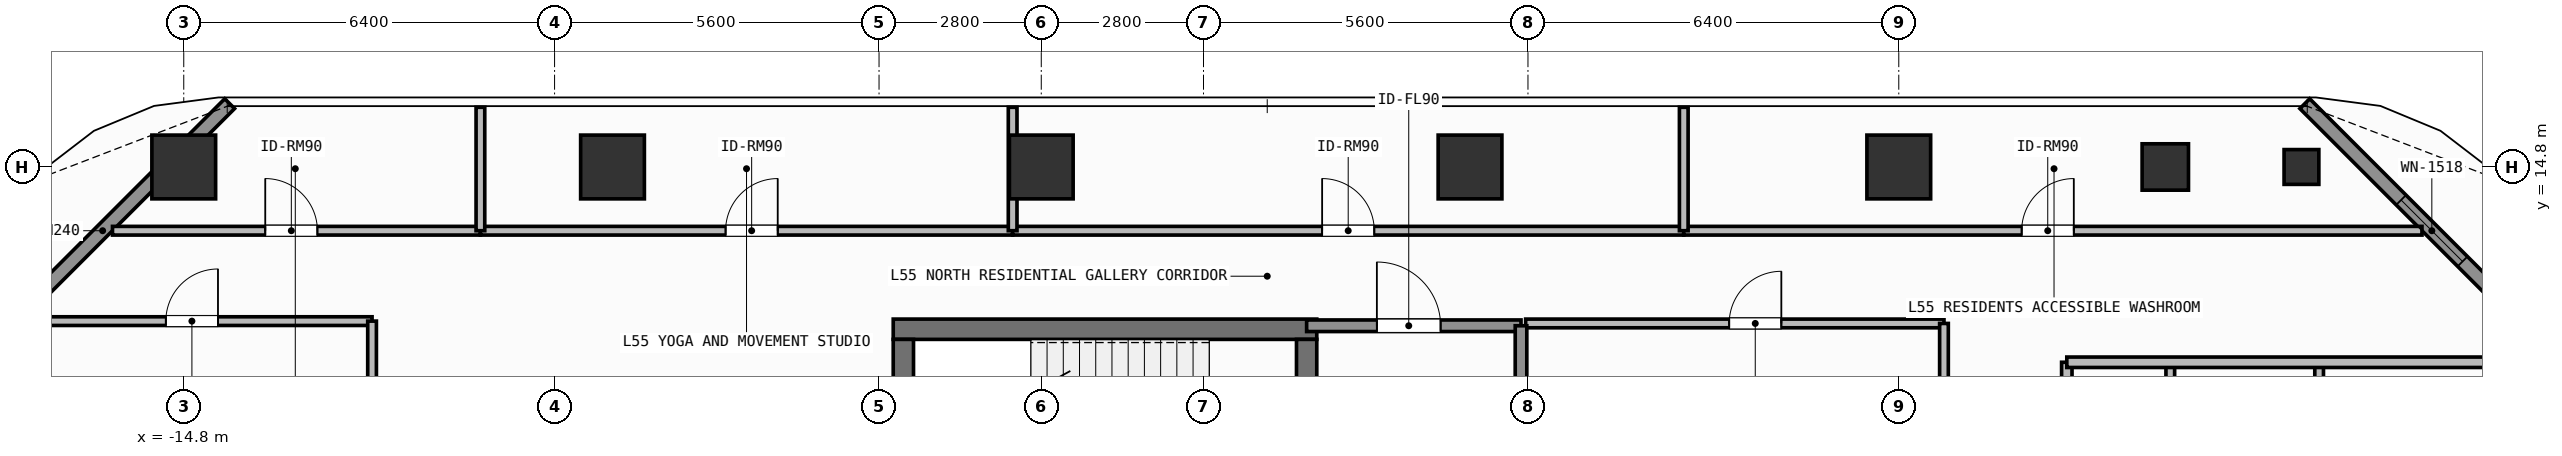
"""IFC4 building model, lengths in metres.
Left out: names, types, materials, properties, quantities, classifications, styles, units other than length and angle.
Written with IfcOpenShell. Run it as: python <this file> out.ifc"""

import sys

from ifc_helpers import new_model, si_unit, direction, frame, frame_2d, origin, origin_2d, place, context, subcontext, project, spatial, rectangle, hollow_rectangle, extrude, element, fill, save


model = new_model("IFC4")
c1 = context("Model", 3, precision=1e-05, world=origin(), true_north=direction((0.0, 1.0)))
c2 = subcontext(c1, "Body", "Model", "MODEL_VIEW")
j1 = project(units=[si_unit("LENGTHUNIT", "METRE"), si_unit("PLANEANGLEUNIT", "RADIAN")], contexts=[c1])
p1 = place(None, origin())
s1 = spatial("IfcSite", under=j1, at=p1, CompositionType="ELEMENT")
p2 = place(p1, origin())
s2 = spatial("IfcBuilding", under=s1, at=p2, CompositionType="ELEMENT")
p3 = place(p2, frame((0.0, 0.0, 223.5)))
s3 = spatial("IfcBuildingStorey", under=s2, at=p3, CompositionType="ELEMENT", Elevation=223.5)
p4 = place(p3, frame((-2.555, 12.0, 0.0), z_axis=(0.0, 0.0, 1.0), x_axis=(1.0, 0.0, 0.0)))
e1 = element("IfcWall", 1, at=p4, inside=s3, PredefinedType="SHEAR", context=c2, shape_type="SweptSolid", body=[
    extrude(rectangle(XDim=7.31, YDim=0.35, at=frame_2d((3.655, 0.0))), origin(), (0.0, 0.0, 1.0), 3.9),
])
p5 = place(p3, frame((-2.38, 8.9, 0.0), z_axis=(0.0, 0.0, 1.0), x_axis=(0.0, 1.0, 0.0)))
e2 = element("IfcWall", 2, at=p5, inside=s3, PredefinedType="SHEAR", context=c2, shape_type="SweptSolid", body=[
    extrude(rectangle(XDim=2.925, YDim=0.35, at=frame_2d((1.462, 0.0))), origin(), (0.0, 0.0, 1.0), 3.9),
])
p6 = place(p3, frame((4.58, 11.825, 0.0), z_axis=(0.0, 0.0, 1.0), x_axis=(0.0, -1.0, 0.0)))
e3 = element("IfcWall", 3, at=p6, inside=s3, PredefinedType="SHEAR", context=c2, shape_type="SweptSolid", body=[
    extrude(rectangle(XDim=2.925, YDim=0.35, at=frame_2d((1.462, 0.0))), origin(), (0.0, 0.0, 1.0), 3.9),
])
p7 = place(p6, frame((0.913, 0.0, 0.0)))
e4 = element("IfcOpeningElement", 4, at=p7, cuts=e3, PredefinedType="OPENING", context=c2, shape_type="SweptSolid", body=[
    extrude(rectangle(XDim=1.1, YDim=2.15, at=frame_2d((0.55, 1.075))), frame((0.0, 0.185, 0.0), z_axis=(0.0, -1.0, 0.0), x_axis=(1.0, 0.0, 0.0)), (0.0, 0.0, 1.0), 0.37),
])
for number, where, z_axis, x_axis in (
    (5, (-14.8, 14.8, 0.0), (0.0, 0.0, 1.0), (1.0, 0.0, 0.0)),
    (6, (-7.4, 14.8, 0.0), (0.0, 0.0, 1.0), (1.0, 0.0, 0.0)),
    (7, (0.0, 14.8, 0.0), (0.0, 0.0, 1.0), (1.0, 0.0, 0.0)),
    (8, (7.4, 14.8, 0.0), (0.0, 0.0, 1.0), (1.0, 0.0, 0.0)),
    (9, (14.8, 14.8, 0.0), (0.0, 0.0, 1.0), (1.0, 0.0, 0.0)),
):
    element("IfcColumn", number, at=place(p3, frame(where, z_axis=z_axis, x_axis=x_axis)), inside=s3, PredefinedType="COLUMN", context=c2, shape_type="SweptSolid", body=[
        extrude(rectangle(XDim=1.1, YDim=1.1, at=origin_2d()), origin(), (0.0, 0.0, 1.0), 3.9),
    ])
p8 = place(p3, frame((19.4, 14.8, 0.0), z_axis=(0.0, 0.0, 1.0), x_axis=(1.0, 0.0, 0.0)))
e10 = element("IfcColumn", 10, at=p8, inside=s3, PredefinedType="COLUMN", context=c2, shape_type="SweptSolid", body=[
    extrude(hollow_rectangle(XDim=0.8, YDim=0.8, WallThickness=0.036, at=origin_2d()), origin(), (0.0, 0.0, 1.0), 3.9),
])
p9 = place(p3, frame((21.75, 14.8, 0.0), z_axis=(0.0, 0.0, 1.0), x_axis=(1.0, 0.0, 0.0)))
e11 = element("IfcColumn", 11, at=p9, inside=s3, PredefinedType="COLUMN", context=c2, shape_type="SweptSolid", body=[
    extrude(hollow_rectangle(XDim=0.6, YDim=0.6, WallThickness=0.028, at=origin_2d()), origin(), (0.0, 0.0, 1.0), 3.9),
])
p10 = place(p3, frame((-18.392, 11.508, 0.0), z_axis=(0.0, 0.0, 1.0), x_axis=(0.707106781187, 0.707106781187, 0.0)))
e12 = element("IfcWall", 12, at=p10, inside=s3, PredefinedType="SOLIDWALL", context=c2, shape_type="SweptSolid", body=[
    extrude(rectangle(XDim=6.201, YDim=0.24, at=frame_2d((3.101, 0.0))), origin(), (0.0, 0.0, 1.0), 3.68),
])
p11 = place(p3, frame((21.808, 15.892, 0.0), z_axis=(0.0, 0.0, 1.0), x_axis=(0.707106781187, -0.707106781187, 0.0)))
e13 = element("IfcWall", 13, at=p11, inside=s3, PredefinedType="SOLIDWALL", context=c2, shape_type="SweptSolid", body=[
    extrude(rectangle(XDim=6.201, YDim=0.24, at=frame_2d((3.101, 0.0))), origin(), (0.0, 0.0, 1.0), 3.68),
])
p12 = place(p11, frame((2.351, 0.0, 0.8)))
e14 = element("IfcOpeningElement", 14, at=p12, cuts=e13, PredefinedType="OPENING", context=c2, shape_type="SweptSolid", body=[
    extrude(rectangle(XDim=1.5, YDim=1.85, at=frame_2d((0.75, 0.925))), frame((0.0, 0.13, 0.0), z_axis=(0.0, -1.0, 0.0), x_axis=(1.0, 0.0, 0.0)), (0.0, 0.0, 1.0), 0.26),
])
p13 = place(p3, frame((4.58, 12.06, 0.0), z_axis=(0.0, 0.0, 1.0), x_axis=(1.0, 0.0, 0.0)))
e15 = element("IfcWall", 15, at=p13, inside=s3, PredefinedType="SOLIDWALL", context=c2, shape_type="SweptSolid", body=[
    extrude(rectangle(XDim=3.7, YDim=0.2, at=frame_2d((1.85, 0.0))), origin(), (0.0, 0.0, 1.0), 3.68),
])
p14 = place(p13, frame((1.212, 0.0, 0.0)))
e16 = element("IfcOpeningElement", 16, at=p14, cuts=e15, PredefinedType="OPENING", context=c2, shape_type="SweptSolid", body=[
    extrude(rectangle(XDim=1.1, YDim=2.15, at=frame_2d((0.55, 1.075))), frame((0.0, 0.11, 0.0), z_axis=(0.0, -1.0, 0.0), x_axis=(1.0, 0.0, 0.0)), (0.0, 0.0, 1.0), 0.22),
])
p15 = place(p3, frame((8.36, 12.1, 0.0), z_axis=(0.0, 0.0, 1.0), x_axis=(1.0, 0.0, 0.0)))
e17 = element("IfcWall", 17, at=p15, inside=s3, PredefinedType="PARTITIONING", context=c2, shape_type="SweptSolid", body=[
    extrude(rectangle(XDim=7.22, YDim=0.15, at=frame_2d((3.61, 0.0))), origin(), (0.0, 0.0, 1.0), 3.68),
])
p16 = place(p15, frame((3.513, 0.0, 0.0)))
e18 = element("IfcOpeningElement", 18, at=p16, cuts=e17, PredefinedType="OPENING", context=c2, shape_type="SweptSolid", body=[
    extrude(rectangle(XDim=0.9, YDim=2.1, at=frame_2d((0.45, 1.05))), frame((0.0, 0.085, 0.0), z_axis=(0.0, -1.0, 0.0), x_axis=(1.0, 0.0, 0.0)), (0.0, 0.0, 1.0), 0.17),
])
p17 = place(p3, frame((-16.03, 13.7, 0.0), z_axis=(0.0, 0.0, 1.0), x_axis=(1.0, 0.0, 0.0)))
e19 = element("IfcWall", 19, at=p17, inside=s3, PredefinedType="PARTITIONING", context=c2, shape_type="SweptSolid", body=[
    extrude(rectangle(XDim=6.35, YDim=0.15, at=frame_2d((3.175, 0.0))), origin(), (0.0, 0.0, 1.0), 3.68),
])
p18 = place(p17, frame((2.637, 0.0, 0.0)))
e20 = element("IfcOpeningElement", 20, at=p18, cuts=e19, PredefinedType="OPENING", context=c2, shape_type="SweptSolid", body=[
    extrude(rectangle(XDim=0.9, YDim=2.1, at=frame_2d((0.45, 1.05))), frame((0.0, 0.085, 0.0), z_axis=(0.0, -1.0, 0.0), x_axis=(1.0, 0.0, 0.0)), (0.0, 0.0, 1.0), 0.17),
])
p19 = place(p3, frame((-9.68, 13.7, 0.0), z_axis=(0.0, 0.0, 1.0), x_axis=(1.0, 0.0, 0.0)))
e21 = element("IfcWall", 21, at=p19, inside=s3, PredefinedType="PARTITIONING", context=c2, shape_type="SweptSolid", body=[
    extrude(rectangle(XDim=9.186, YDim=0.15, at=frame_2d((4.593, 0.0))), origin(), (0.0, 0.0, 1.0), 3.68),
])
p20 = place(p19, frame((4.231, 0.0, 0.0)))
e22 = element("IfcOpeningElement", 22, at=p20, cuts=e21, PredefinedType="OPENING", context=c2, shape_type="SweptSolid", body=[
    extrude(rectangle(XDim=0.9, YDim=2.1, at=frame_2d((0.45, 1.05))), frame((0.0, 0.085, 0.0), z_axis=(0.0, -1.0, 0.0), x_axis=(1.0, 0.0, 0.0)), (0.0, 0.0, 1.0), 0.17),
])
p21 = place(p3, frame((-0.494, 13.7, 0.0), z_axis=(0.0, 0.0, 1.0), x_axis=(1.0, 0.0, 0.0)))
e23 = element("IfcWall", 23, at=p21, inside=s3, PredefinedType="PARTITIONING", context=c2, shape_type="SweptSolid", body=[
    extrude(rectangle(XDim=11.583, YDim=0.15, at=frame_2d((5.792, 0.0))), origin(), (0.0, 0.0, 1.0), 3.68),
])
p22 = place(p21, frame((5.342, 0.0, 0.0)))
e24 = element("IfcOpeningElement", 24, at=p22, cuts=e23, PredefinedType="OPENING", context=c2, shape_type="SweptSolid", body=[
    extrude(rectangle(XDim=0.9, YDim=2.1, at=frame_2d((0.45, 1.05))), frame((0.0, 0.085, 0.0), z_axis=(0.0, -1.0, 0.0), x_axis=(1.0, 0.0, 0.0)), (0.0, 0.0, 1.0), 0.17),
])
p23 = place(p3, frame((11.089, 13.7, 0.0), z_axis=(0.0, 0.0, 1.0), x_axis=(1.0, 0.0, 0.0)))
e25 = element("IfcWall", 25, at=p23, inside=s3, PredefinedType="PARTITIONING", context=c2, shape_type="SweptSolid", body=[
    extrude(rectangle(XDim=12.741, YDim=0.15, at=frame_2d((6.371, 0.0))), origin(), (0.0, 0.0, 1.0), 3.68),
])
p24 = place(p23, frame((5.832, 0.0, 0.0)))
e26 = element("IfcOpeningElement", 26, at=p24, cuts=e25, PredefinedType="OPENING", context=c2, shape_type="SweptSolid", body=[
    extrude(rectangle(XDim=0.9, YDim=2.1, at=frame_2d((0.45, 1.05))), frame((0.0, 0.085, 0.0), z_axis=(0.0, -1.0, 0.0), x_axis=(1.0, 0.0, 0.0)), (0.0, 0.0, 1.0), 0.17),
])
p25 = place(p3, frame((-17.59, 12.14, 0.0), z_axis=(0.0, 0.0, 1.0), x_axis=(1.0, 0.0, 0.0)))
e27 = element("IfcWall", 27, at=p25, inside=s3, PredefinedType="PARTITIONING", context=c2, shape_type="SweptSolid", body=[
    extrude(rectangle(XDim=6.04, YDim=0.15, at=frame_2d((3.02, 0.0))), origin(), (0.0, 0.0, 1.0), 3.68),
])
p26 = place(p25, frame((2.481, 0.0, 0.0)))
e28 = element("IfcOpeningElement", 28, at=p26, cuts=e27, PredefinedType="OPENING", context=c2, shape_type="SweptSolid", body=[
    extrude(rectangle(XDim=0.9, YDim=2.1, at=frame_2d((0.45, 1.05))), frame((0.0, 0.085, 0.0), z_axis=(0.0, -1.0, 0.0), x_axis=(1.0, 0.0, 0.0)), (0.0, 0.0, 1.0), 0.17),
])
p27 = place(p3, frame((17.7, -12.12, 0.0), z_axis=(0.0, 0.0, 1.0), x_axis=(0.0, 1.0, 0.0)))
e29 = element("IfcWall", 29, at=p27, inside=s3, PredefinedType="PARTITIONING", context=c2, shape_type="SweptSolid", body=[
    extrude(rectangle(XDim=23.55, YDim=0.18, at=frame_2d((11.775, 0.0))), origin(), (0.0, 0.0, 1.0), 3.68),
])
p28 = place(p27, frame((11.454, 0.0, 0.0)))
e30 = element("IfcOpeningElement", 30, at=p28, cuts=e29, PredefinedType="OPENING", context=c2, shape_type="SweptSolid", body=[
    extrude(rectangle(XDim=1.0, YDim=2.2, at=frame_2d((0.5, 1.1))), frame((0.0, 0.1, 0.0), z_axis=(0.0, -1.0, 0.0), x_axis=(1.0, 0.0, 0.0)), (0.0, 0.0, 1.0), 0.2),
])
p29 = place(p3, frame((8.28, 8.8, 0.0), z_axis=(0.0, 0.0, 1.0), x_axis=(0.0, 1.0, 0.0)))
e31 = element("IfcWall", 31, at=p29, inside=s3, PredefinedType="SOLIDWALL", context=c2, shape_type="SweptSolid", body=[
    extrude(rectangle(XDim=3.26, YDim=0.2, at=frame_2d((1.63, 0.0))), origin(), (0.0, 0.0, 1.0), 3.68),
])
p30 = place(p3, frame((15.58, 5.85, 0.0), z_axis=(0.0, 0.0, 1.0), x_axis=(0.0, 1.0, 0.0)))
e32 = element("IfcWall", 32, at=p30, inside=s3, PredefinedType="PARTITIONING", context=c2, shape_type="SweptSolid", body=[
    extrude(rectangle(XDim=6.25, YDim=0.15, at=frame_2d((3.125, 0.0))), origin(), (0.0, 0.0, 1.0), 3.68),
])
for number, where, z_axis, x_axis in (
    (33, (-9.68, 13.7, 0.0), (0.0, 0.0, 1.0), (0.0, 1.0, 0.0)),
    (34, (-0.494, 13.7, 0.0), (0.0, 0.0, 1.0), (0.0, 1.0, 0.0)),
    (35, (11.089, 13.7, 0.0), (0.0, 0.0, 1.0), (0.0, 1.0, 0.0)),
):
    element("IfcWall", number, at=place(p3, frame(where, z_axis=z_axis, x_axis=x_axis)), inside=s3, PredefinedType="PARTITIONING", context=c2, shape_type="SweptSolid", body=[
        extrude(rectangle(XDim=2.13, YDim=0.15, at=frame_2d((1.065, 0.0))), origin(), (0.0, 0.0, 1.0), 3.68),
    ])
p31 = place(p3, frame((-11.55, 4.1, 0.0), z_axis=(0.0, 0.0, 1.0), x_axis=(0.0, 1.0, 0.0)))
e36 = element("IfcWall", 36, at=p31, inside=s3, PredefinedType="PARTITIONING", context=c2, shape_type="SweptSolid", body=[
    extrude(rectangle(XDim=8.04, YDim=0.15, at=frame_2d((4.02, 0.0))), origin(), (0.0, 0.0, 1.0), 3.68),
])
p32 = place(p3, frame((19.486, 5.282, 0.0), z_axis=(0.0, 0.0, 1.0), x_axis=(0.0, 1.0, 0.0)))
e37 = element("IfcWall", 37, at=p32, inside=s3, PredefinedType="PARTITIONING", context=c2, shape_type="SweptSolid", body=[
    extrude(rectangle(XDim=6.148, YDim=0.15, at=frame_2d((3.074, 0.0))), origin(), (0.0, 0.0, 1.0), 3.182),
])
p33 = place(p3, frame((22.055, 5.282, 0.0), z_axis=(0.0, 0.0, 1.0), x_axis=(0.0, 1.0, 0.0)))
e38 = element("IfcWall", 38, at=p33, inside=s3, PredefinedType="PARTITIONING", context=c2, shape_type="SweptSolid", body=[
    extrude(rectangle(XDim=6.148, YDim=0.15, at=frame_2d((3.074, 0.0))), origin(), (0.0, 0.0, 1.0), 3.68),
])
p34 = place(p3, frame((17.7, 11.43, 0.0), z_axis=(0.0, 0.0, 1.0), x_axis=(1.0, 0.0, 0.0)))
e39 = element("IfcWall", 39, at=p34, inside=s3, PredefinedType="PARTITIONING", context=c2, shape_type="SweptSolid", body=[
    extrude(rectangle(XDim=8.43, YDim=0.18, at=frame_2d((4.215, 0.0))), origin(), (0.0, 0.0, 1.0), 3.42),
])
p35 = place(p12, origin())
e40 = element("IfcWindow", 40, at=p35, inside=s3, PartitioningType="SINGLE_PANEL", PredefinedType="WINDOW", context=c2, shape_type="SweptSolid", body=[
    extrude(rectangle(XDim=1.5, YDim=1.85, at=frame_2d((0.75, 0.925))), frame((0.0, 0.03, 0.0), z_axis=(0.0, -1.0, 0.0), x_axis=(1.0, 0.0, 0.0)), (0.0, 0.0, 1.0), 0.06),
])
fill(e14, e40)
p36 = place(p14, origin())
e41 = element("IfcDoor", 41, at=p36, inside=s3, OperationType="SINGLE_SWING_LEFT", PredefinedType="DOOR", context=c2, shape_type="SweptSolid", body=[
    extrude(rectangle(XDim=1.1, YDim=2.15, at=frame_2d((0.55, 1.075))), frame((0.0, 0.025, 0.0), z_axis=(0.0, -1.0, 0.0), x_axis=(1.0, 0.0, 0.0)), (0.0, 0.0, 1.0), 0.05),
])
fill(e16, e41)
p37 = place(p16, origin())
e42 = element("IfcDoor", 42, at=p37, inside=s3, OperationType="SINGLE_SWING_RIGHT", PredefinedType="DOOR", context=c2, shape_type="SweptSolid", body=[
    extrude(rectangle(XDim=0.9, YDim=2.1, at=frame_2d((0.45, 1.05))), frame((0.0, 0.025, 0.0), z_axis=(0.0, -1.0, 0.0), x_axis=(1.0, 0.0, 0.0)), (0.0, 0.0, 1.0), 0.05),
])
fill(e18, e42)
p38 = place(p18, origin())
e43 = element("IfcDoor", 43, at=p38, inside=s3, OperationType="SINGLE_SWING_LEFT", PredefinedType="DOOR", context=c2, shape_type="SweptSolid", body=[
    extrude(rectangle(XDim=0.9, YDim=2.1, at=frame_2d((0.45, 1.05))), frame((0.0, 0.025, 0.0), z_axis=(0.0, -1.0, 0.0), x_axis=(1.0, 0.0, 0.0)), (0.0, 0.0, 1.0), 0.05),
])
fill(e20, e43)
p39 = place(p20, origin())
e44 = element("IfcDoor", 44, at=p39, inside=s3, OperationType="SINGLE_SWING_RIGHT", PredefinedType="DOOR", context=c2, shape_type="SweptSolid", body=[
    extrude(rectangle(XDim=0.9, YDim=2.1, at=frame_2d((0.45, 1.05))), frame((0.0, 0.025, 0.0), z_axis=(0.0, -1.0, 0.0), x_axis=(1.0, 0.0, 0.0)), (0.0, 0.0, 1.0), 0.05),
])
fill(e22, e44)
p40 = place(p22, origin())
e45 = element("IfcDoor", 45, at=p40, inside=s3, OperationType="SINGLE_SWING_LEFT", PredefinedType="DOOR", context=c2, shape_type="SweptSolid", body=[
    extrude(rectangle(XDim=0.9, YDim=2.1, at=frame_2d((0.45, 1.05))), frame((0.0, 0.025, 0.0), z_axis=(0.0, -1.0, 0.0), x_axis=(1.0, 0.0, 0.0)), (0.0, 0.0, 1.0), 0.05),
])
fill(e24, e45)
p41 = place(p24, origin())
e46 = element("IfcDoor", 46, at=p41, inside=s3, OperationType="SINGLE_SWING_RIGHT", PredefinedType="DOOR", context=c2, shape_type="SweptSolid", body=[
    extrude(rectangle(XDim=0.9, YDim=2.1, at=frame_2d((0.45, 1.05))), frame((0.0, 0.025, 0.0), z_axis=(0.0, -1.0, 0.0), x_axis=(1.0, 0.0, 0.0)), (0.0, 0.0, 1.0), 0.05),
])
fill(e26, e46)
p42 = place(p26, origin())
e47 = element("IfcDoor", 47, at=p42, inside=s3, OperationType="SINGLE_SWING_RIGHT", PredefinedType="DOOR", context=c2, shape_type="SweptSolid", body=[
    extrude(rectangle(XDim=0.9, YDim=2.1, at=frame_2d((0.45, 1.05))), frame((0.0, 0.025, 0.0), z_axis=(0.0, -1.0, 0.0), x_axis=(1.0, 0.0, 0.0)), (0.0, 0.0, 1.0), 0.05),
])
fill(e28, e47)
save(model, sys.argv[1])
